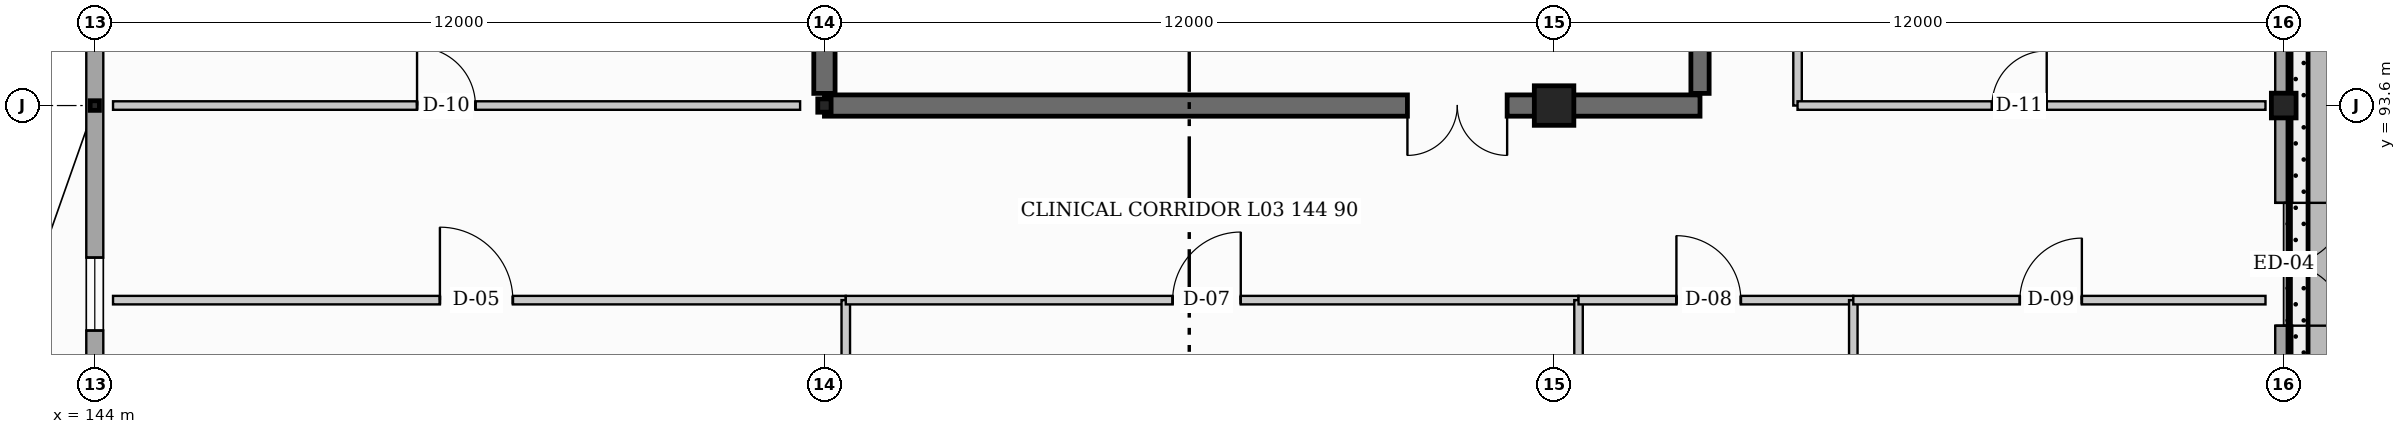
"""IFC4 building model, lengths in metres.
Left out: names, types, materials, properties, quantities, classifications, styles, units other than length and angle.
Written with IfcOpenShell. Run it as: python <this file> out.ifc"""

import sys

from ifc_helpers import new_model, si_unit, direction, frame, frame_2d, origin, origin_2d, place, context, subcontext, project, spatial, rectangle, hollow_circle, i_section, extrude, element, fill, save


model = new_model("IFC4")
c1 = context("Model", 3, precision=1e-05, world=origin(), true_north=direction((0.0, 1.0)))
c2 = subcontext(c1, "Body", "Model", "MODEL_VIEW")
j1 = project(units=[si_unit("LENGTHUNIT", "METRE"), si_unit("PLANEANGLEUNIT", "RADIAN")], contexts=[c1])
p1 = place(None, origin())
s1 = spatial("IfcSite", under=j1, at=p1, CompositionType="ELEMENT")
p2 = place(p1, origin())
s2 = spatial("IfcBuilding", under=s1, at=p2, CompositionType="ELEMENT")
p3 = place(p2, frame((0.0, 0.0, 14.4)))
s3 = spatial("IfcBuildingStorey", under=s2, at=p3, CompositionType="ELEMENT", Elevation=14.4)
p4 = place(p3, frame((144.0, 93.6, 0.0), z_axis=(0.0, 0.0, 1.0), x_axis=(1.0, 0.0, 0.0)))
e1 = element("IfcColumn", 1, at=p4, inside=s3, PredefinedType="COLUMN", context=c2, shape_type="SweptSolid", body=[
    extrude(i_section(OverallWidth=0.153, OverallDepth=0.158, WebThickness=0.007, FlangeThickness=0.01, at=origin_2d()), origin(), (0.0, 0.0, 1.0), 3.9),
])
p5 = place(p3, frame((156.0, 93.6, 0.0), z_axis=(0.0, 0.0, 1.0), x_axis=(0.0, 1.0, 0.0)))
e2 = element("IfcColumn", 2, at=p5, inside=s3, PredefinedType="COLUMN", context=c2, shape_type="SweptSolid", body=[
    extrude(hollow_circle(Radius=0.11, WallThickness=0.01, at=origin_2d()), origin(), (0.0, 0.0, 1.0), 3.9),
])
p6 = place(p3, frame((168.0, 93.6, 0.0), z_axis=(0.0, 0.0, 1.0), x_axis=(1.0, 0.0, 0.0)))
e3 = element("IfcColumn", 3, at=p6, inside=s3, PredefinedType="COLUMN", context=c2, shape_type="SweptSolid", body=[
    extrude(rectangle(XDim=0.65, YDim=0.65, at=origin_2d()), origin(), (0.0, 0.0, 1.0), 3.9),
])
p7 = place(p3, frame((180.0, 93.6, 0.0), z_axis=(0.0, 0.0, 1.0), x_axis=(0.0, 1.0, 0.0)))
e4 = element("IfcColumn", 4, at=p7, inside=s3, PredefinedType="COLUMN", context=c2, shape_type="SweptSolid", body=[
    extrude(hollow_circle(Radius=0.203, WallThickness=0.016, at=origin_2d()), origin(), (0.0, 0.0, 1.0), 3.9),
])
p8 = place(p3, frame((170.4, 93.6, 0.0), z_axis=(0.0, 0.0, 1.0), x_axis=(-1.0, 0.0, 0.0)))
e5 = element("IfcWall", 5, at=p8, inside=s3, PredefinedType="SHEAR", context=c2, shape_type="SweptSolid", body=[
    extrude(rectangle(XDim=14.4, YDim=0.35, at=frame_2d((7.2, 0.0))), origin(), (0.0, 0.0, 1.0), 3.9),
])
p9 = place(p8, frame((3.172, 0.0, 0.0)))
e6 = element("IfcOpeningElement", 6, at=p9, cuts=e5, PredefinedType="OPENING", context=c2, shape_type="SweptSolid", body=[
    extrude(rectangle(XDim=1.64, YDim=2.2, at=frame_2d((0.82, 1.1))), frame((0.0, 0.185, 0.0), z_axis=(0.0, -1.0, 0.0), x_axis=(1.0, 0.0, 0.0)), (0.0, 0.0, 1.0), 0.37),
])
p10 = place(p3, frame((156.0, 93.8, 0.0), z_axis=(0.0, 0.0, 1.0), x_axis=(0.0, 1.0, 0.0)))
e7 = element("IfcWall", 7, at=p10, inside=s3, PredefinedType="SHEAR", context=c2, shape_type="SweptSolid", body=[
    extrude(rectangle(XDim=8.0, YDim=0.35, at=frame_2d((4.0, 0.0))), origin(), (0.0, 0.0, 1.0), 3.9),
])
p11 = place(p3, frame((170.4, 101.8, 0.0), z_axis=(0.0, 0.0, 1.0), x_axis=(0.0, -1.0, 0.0)))
e8 = element("IfcWall", 8, at=p11, inside=s3, PredefinedType="SHEAR", context=c2, shape_type="SweptSolid", body=[
    extrude(rectangle(XDim=8.0, YDim=0.3, at=frame_2d((4.0, 0.0))), origin(), (0.0, 0.0, 1.0), 3.9),
])
p12 = place(p3, frame((180.0, 126.0, 0.0), z_axis=(0.0, 0.0, 1.0), x_axis=(0.0, -1.0, 0.0)))
e9 = element("IfcWall", 9, at=p12, inside=s3, PredefinedType="STANDARD", context=c2, shape_type="SweptSolid", body=[
    extrude(rectangle(XDim=44.4, YDim=0.28, at=frame_2d((22.2, 0.0))), origin(), (0.0, 0.0, 1.0), 2.935),
])
p13 = place(p12, frame((34.0, 0.0, 0.0)))
e10 = element("IfcOpeningElement", 10, at=p13, cuts=e9, PredefinedType="OPENING", context=c2, shape_type="SweptSolid", body=[
    extrude(rectangle(XDim=2.02, YDim=2.2, at=frame_2d((1.01, 1.1))), frame((0.0, 0.15, 0.0), z_axis=(0.0, -1.0, 0.0), x_axis=(1.0, 0.0, 0.0)), (0.0, 0.0, 1.0), 0.3),
])
p14 = place(p12, frame((1.1, 0.0, 0.695)))
e11 = element("IfcOpeningElement", 11, at=p14, cuts=e9, PredefinedType="OPENING", context=c2, shape_type="SweptSolid", body=[
    extrude(rectangle(XDim=0.9, YDim=2.1, at=frame_2d((0.45, 1.05))), frame((0.0, 0.15, 0.0), z_axis=(0.0, -1.0, 0.0), x_axis=(1.0, 0.0, 0.0)), (0.0, 0.0, 1.0), 0.3),
])
p15 = place(p12, frame((4.7, 0.0, 0.695)))
e12 = element("IfcOpeningElement", 12, at=p15, cuts=e9, PredefinedType="OPENING", context=c2, shape_type="SweptSolid", body=[
    extrude(rectangle(XDim=0.9, YDim=2.1, at=frame_2d((0.45, 1.05))), frame((0.0, 0.15, 0.0), z_axis=(0.0, -1.0, 0.0), x_axis=(1.0, 0.0, 0.0)), (0.0, 0.0, 1.0), 0.3),
])
p16 = place(p12, frame((8.3, 0.0, 0.695)))
e13 = element("IfcOpeningElement", 13, at=p16, cuts=e9, PredefinedType="OPENING", context=c2, shape_type="SweptSolid", body=[
    extrude(rectangle(XDim=0.9, YDim=2.1, at=frame_2d((0.45, 1.05))), frame((0.0, 0.15, 0.0), z_axis=(0.0, -1.0, 0.0), x_axis=(1.0, 0.0, 0.0)), (0.0, 0.0, 1.0), 0.3),
])
p17 = place(p12, frame((11.9, 0.0, 0.695)))
e14 = element("IfcOpeningElement", 14, at=p17, cuts=e9, PredefinedType="OPENING", context=c2, shape_type="SweptSolid", body=[
    extrude(rectangle(XDim=0.9, YDim=2.1, at=frame_2d((0.45, 1.05))), frame((0.0, 0.15, 0.0), z_axis=(0.0, -1.0, 0.0), x_axis=(1.0, 0.0, 0.0)), (0.0, 0.0, 1.0), 0.3),
])
p18 = place(p12, frame((15.5, 0.0, 0.695)))
e15 = element("IfcOpeningElement", 15, at=p18, cuts=e9, PredefinedType="OPENING", context=c2, shape_type="SweptSolid", body=[
    extrude(rectangle(XDim=0.9, YDim=2.1, at=frame_2d((0.45, 1.05))), frame((0.0, 0.15, 0.0), z_axis=(0.0, -1.0, 0.0), x_axis=(1.0, 0.0, 0.0)), (0.0, 0.0, 1.0), 0.3),
])
p19 = place(p12, frame((19.1, 0.0, 0.695)))
e16 = element("IfcOpeningElement", 16, at=p19, cuts=e9, PredefinedType="OPENING", context=c2, shape_type="SweptSolid", body=[
    extrude(rectangle(XDim=0.9, YDim=2.1, at=frame_2d((0.45, 1.05))), frame((0.0, 0.15, 0.0), z_axis=(0.0, -1.0, 0.0), x_axis=(1.0, 0.0, 0.0)), (0.0, 0.0, 1.0), 0.3),
])
p20 = place(p12, frame((22.7, 0.0, 0.695)))
e17 = element("IfcOpeningElement", 17, at=p20, cuts=e9, PredefinedType="OPENING", context=c2, shape_type="SweptSolid", body=[
    extrude(rectangle(XDim=0.9, YDim=2.1, at=frame_2d((0.45, 1.05))), frame((0.0, 0.15, 0.0), z_axis=(0.0, -1.0, 0.0), x_axis=(1.0, 0.0, 0.0)), (0.0, 0.0, 1.0), 0.3),
])
p21 = place(p12, frame((26.3, 0.0, 0.695)))
e18 = element("IfcOpeningElement", 18, at=p21, cuts=e9, PredefinedType="OPENING", context=c2, shape_type="SweptSolid", body=[
    extrude(rectangle(XDim=0.9, YDim=2.1, at=frame_2d((0.45, 1.05))), frame((0.0, 0.15, 0.0), z_axis=(0.0, -1.0, 0.0), x_axis=(1.0, 0.0, 0.0)), (0.0, 0.0, 1.0), 0.3),
])
p22 = place(p12, frame((29.9, 0.0, 0.695)))
e19 = element("IfcOpeningElement", 19, at=p22, cuts=e9, PredefinedType="OPENING", context=c2, shape_type="SweptSolid", body=[
    extrude(rectangle(XDim=0.9, YDim=2.1, at=frame_2d((0.45, 1.05))), frame((0.0, 0.15, 0.0), z_axis=(0.0, -1.0, 0.0), x_axis=(1.0, 0.0, 0.0)), (0.0, 0.0, 1.0), 0.3),
])
p23 = place(p12, frame((37.1, 0.0, 0.695)))
e20 = element("IfcOpeningElement", 20, at=p23, cuts=e9, PredefinedType="OPENING", context=c2, shape_type="SweptSolid", body=[
    extrude(rectangle(XDim=0.9, YDim=2.1, at=frame_2d((0.45, 1.05))), frame((0.0, 0.15, 0.0), z_axis=(0.0, -1.0, 0.0), x_axis=(1.0, 0.0, 0.0)), (0.0, 0.0, 1.0), 0.3),
])
p24 = place(p12, frame((40.7, 0.0, 0.695)))
e21 = element("IfcOpeningElement", 21, at=p24, cuts=e9, PredefinedType="OPENING", context=c2, shape_type="SweptSolid", body=[
    extrude(rectangle(XDim=0.9, YDim=2.1, at=frame_2d((0.45, 1.05))), frame((0.0, 0.15, 0.0), z_axis=(0.0, -1.0, 0.0), x_axis=(1.0, 0.0, 0.0)), (0.0, 0.0, 1.0), 0.3),
])
p25 = place(p3, frame((144.0, 81.6, 0.0), z_axis=(0.0, 0.0, 1.0), x_axis=(0.0, 1.0, 0.0)))
e22 = element("IfcWall", 22, at=p25, inside=s3, PredefinedType="STANDARD", context=c2, shape_type="SweptSolid", body=[
    extrude(rectangle(XDim=44.4, YDim=0.28, at=frame_2d((22.2, 0.0))), origin(), (0.0, 0.0, 1.0), 2.935),
])
p26 = place(p25, frame((1.1, 0.0, 0.95)))
e23 = element("IfcOpeningElement", 23, at=p26, cuts=e22, PredefinedType="OPENING", context=c2, shape_type="SweptSolid", body=[
    extrude(rectangle(XDim=1.2, YDim=1.5, at=frame_2d((0.6, 0.75))), frame((0.0, 0.15, 0.0), z_axis=(0.0, -1.0, 0.0), x_axis=(1.0, 0.0, 0.0)), (0.0, 0.0, 1.0), 0.3),
])
p27 = place(p25, frame((4.7, 0.0, 0.95)))
e24 = element("IfcOpeningElement", 24, at=p27, cuts=e22, PredefinedType="OPENING", context=c2, shape_type="SweptSolid", body=[
    extrude(rectangle(XDim=1.2, YDim=1.5, at=frame_2d((0.6, 0.75))), frame((0.0, 0.15, 0.0), z_axis=(0.0, -1.0, 0.0), x_axis=(1.0, 0.0, 0.0)), (0.0, 0.0, 1.0), 0.3),
])
p28 = place(p25, frame((8.3, 0.0, 0.95)))
e25 = element("IfcOpeningElement", 25, at=p28, cuts=e22, PredefinedType="OPENING", context=c2, shape_type="SweptSolid", body=[
    extrude(rectangle(XDim=1.2, YDim=1.5, at=frame_2d((0.6, 0.75))), frame((0.0, 0.15, 0.0), z_axis=(0.0, -1.0, 0.0), x_axis=(1.0, 0.0, 0.0)), (0.0, 0.0, 1.0), 0.3),
])
p29 = place(p25, frame((15.5, 0.0, 0.95)))
e26 = element("IfcOpeningElement", 26, at=p29, cuts=e22, PredefinedType="OPENING", context=c2, shape_type="SweptSolid", body=[
    extrude(rectangle(XDim=1.2, YDim=1.5, at=frame_2d((0.6, 0.75))), frame((0.0, 0.15, 0.0), z_axis=(0.0, -1.0, 0.0), x_axis=(1.0, 0.0, 0.0)), (0.0, 0.0, 1.0), 0.3),
])
p30 = place(p25, frame((19.1, 0.0, 0.95)))
e27 = element("IfcOpeningElement", 27, at=p30, cuts=e22, PredefinedType="OPENING", context=c2, shape_type="SweptSolid", body=[
    extrude(rectangle(XDim=1.2, YDim=1.5, at=frame_2d((0.6, 0.75))), frame((0.0, 0.15, 0.0), z_axis=(0.0, -1.0, 0.0), x_axis=(1.0, 0.0, 0.0)), (0.0, 0.0, 1.0), 0.3),
])
p31 = place(p25, frame((26.3, 0.0, 0.95)))
e28 = element("IfcOpeningElement", 28, at=p31, cuts=e22, PredefinedType="OPENING", context=c2, shape_type="SweptSolid", body=[
    extrude(rectangle(XDim=1.2, YDim=1.5, at=frame_2d((0.6, 0.75))), frame((0.0, 0.15, 0.0), z_axis=(0.0, -1.0, 0.0), x_axis=(1.0, 0.0, 0.0)), (0.0, 0.0, 1.0), 0.3),
])
p32 = place(p25, frame((29.9, 0.0, 0.95)))
e29 = element("IfcOpeningElement", 29, at=p32, cuts=e22, PredefinedType="OPENING", context=c2, shape_type="SweptSolid", body=[
    extrude(rectangle(XDim=1.2, YDim=1.5, at=frame_2d((0.6, 0.75))), frame((0.0, 0.15, 0.0), z_axis=(0.0, -1.0, 0.0), x_axis=(1.0, 0.0, 0.0)), (0.0, 0.0, 1.0), 0.3),
])
p33 = place(p25, frame((37.1, 0.0, 0.95)))
e30 = element("IfcOpeningElement", 30, at=p33, cuts=e22, PredefinedType="OPENING", context=c2, shape_type="SweptSolid", body=[
    extrude(rectangle(XDim=1.2, YDim=1.5, at=frame_2d((0.6, 0.75))), frame((0.0, 0.15, 0.0), z_axis=(0.0, -1.0, 0.0), x_axis=(1.0, 0.0, 0.0)), (0.0, 0.0, 1.0), 0.3),
])
p34 = place(p25, frame((40.7, 0.0, 0.95)))
e31 = element("IfcOpeningElement", 31, at=p34, cuts=e22, PredefinedType="OPENING", context=c2, shape_type="SweptSolid", body=[
    extrude(rectangle(XDim=1.2, YDim=1.5, at=frame_2d((0.6, 0.75))), frame((0.0, 0.15, 0.0), z_axis=(0.0, -1.0, 0.0), x_axis=(1.0, 0.0, 0.0)), (0.0, 0.0, 1.0), 0.3),
])
p35 = place(p3, frame((144.3, 90.4, 0.0), z_axis=(0.0, 0.0, 1.0), x_axis=(1.0, 0.0, 0.0)))
e32 = element("IfcWall", 32, at=p35, inside=s3, PredefinedType="PARTITIONING", context=c2, shape_type="SweptSolid", body=[
    extrude(rectangle(XDim=12.051, YDim=0.14, at=frame_2d((6.025, 0.0))), origin(), (0.0, 0.0, 1.0), 3.428),
])
p36 = place(p35, frame((5.376, 0.0, 0.0)))
e33 = element("IfcOpeningElement", 33, at=p36, cuts=e32, PredefinedType="OPENING", context=c2, shape_type="SweptSolid", body=[
    extrude(rectangle(XDim=1.2, YDim=2.12, at=frame_2d((0.6, 1.06))), frame((0.0, 0.08, 0.0), z_axis=(0.0, -1.0, 0.0), x_axis=(1.0, 0.0, 0.0)), (0.0, 0.0, 1.0), 0.16),
])
p37 = place(p3, frame((156.351, 81.9, 0.0), z_axis=(0.0, 0.0, 1.0), x_axis=(0.0, 1.0, 0.0)))
e34 = element("IfcWall", 34, at=p37, inside=s3, PredefinedType="PARTITIONING", context=c2, shape_type="SweptSolid", body=[
    extrude(rectangle(XDim=8.5, YDim=0.14, at=frame_2d((4.25, 0.0))), origin(), (0.0, 0.0, 1.0), 3.357),
])
p38 = place(p3, frame((156.351, 90.4, 0.0), z_axis=(0.0, 0.0, 1.0), x_axis=(1.0, 0.0, 0.0)))
e35 = element("IfcWall", 35, at=p38, inside=s3, PredefinedType="PARTITIONING", context=c2, shape_type="SweptSolid", body=[
    extrude(rectangle(XDim=12.051, YDim=0.14, at=frame_2d((6.025, 0.0))), origin(), (0.0, 0.0, 1.0), 2.935),
])
p39 = place(p38, frame((5.376, 0.0, 0.0)))
e36 = element("IfcOpeningElement", 36, at=p39, cuts=e35, PredefinedType="OPENING", context=c2, shape_type="SweptSolid", body=[
    extrude(rectangle(XDim=1.12, YDim=2.08, at=frame_2d((0.56, 1.04))), frame((0.0, 0.08, 0.0), z_axis=(0.0, -1.0, 0.0), x_axis=(1.0, 0.0, 0.0)), (0.0, 0.0, 1.0), 0.16),
])
p40 = place(p3, frame((168.402, 81.9, 0.0), z_axis=(0.0, 0.0, 1.0), x_axis=(0.0, 1.0, 0.0)))
e37 = element("IfcWall", 37, at=p40, inside=s3, PredefinedType="PARTITIONING", context=c2, shape_type="SweptSolid", body=[
    extrude(rectangle(XDim=8.5, YDim=0.14, at=frame_2d((4.25, 0.0))), origin(), (0.0, 0.0, 1.0), 3.425),
])
p41 = place(p3, frame((168.402, 90.4, 0.0), z_axis=(0.0, 0.0, 1.0), x_axis=(1.0, 0.0, 0.0)))
e38 = element("IfcWall", 38, at=p41, inside=s3, PredefinedType="PARTITIONING", context=c2, shape_type="SweptSolid", body=[
    extrude(rectangle(XDim=4.519, YDim=0.14, at=frame_2d((2.259, 0.0))), origin(), (0.0, 0.0, 1.0), 3.56),
])
p42 = place(p41, frame((1.61, 0.0, 0.0)))
e39 = element("IfcOpeningElement", 39, at=p42, cuts=e38, PredefinedType="OPENING", context=c2, shape_type="SweptSolid", body=[
    extrude(rectangle(XDim=1.06, YDim=2.1, at=frame_2d((0.53, 1.05))), frame((0.0, 0.08, 0.0), z_axis=(0.0, -1.0, 0.0), x_axis=(1.0, 0.0, 0.0)), (0.0, 0.0, 1.0), 0.16),
])
p43 = place(p3, frame((172.921, 81.9, 0.0), z_axis=(0.0, 0.0, 1.0), x_axis=(0.0, 1.0, 0.0)))
e40 = element("IfcWall", 40, at=p43, inside=s3, PredefinedType="PARTITIONING", context=c2, shape_type="SweptSolid", body=[
    extrude(rectangle(XDim=8.5, YDim=0.14, at=frame_2d((4.25, 0.0))), origin(), (0.0, 0.0, 1.0), 3.425),
])
p44 = place(p3, frame((172.921, 90.4, 0.0), z_axis=(0.0, 0.0, 1.0), x_axis=(1.0, 0.0, 0.0)))
e41 = element("IfcWall", 41, at=p44, inside=s3, PredefinedType="PARTITIONING", context=c2, shape_type="SweptSolid", body=[
    extrude(rectangle(XDim=6.779, YDim=0.14, at=frame_2d((3.39, 0.0))), origin(), (0.0, 0.0, 1.0), 2.985),
])
p45 = place(p44, frame((2.739, 0.0, 0.0)))
e42 = element("IfcOpeningElement", 42, at=p45, cuts=e41, PredefinedType="OPENING", context=c2, shape_type="SweptSolid", body=[
    extrude(rectangle(XDim=1.02, YDim=2.08, at=frame_2d((0.51, 1.04))), frame((0.0, 0.08, 0.0), z_axis=(0.0, -1.0, 0.0), x_axis=(1.0, 0.0, 0.0)), (0.0, 0.0, 1.0), 0.16),
])
p46 = place(p3, frame((144.3, 93.6, 0.0), z_axis=(0.0, 0.0, 1.0), x_axis=(1.0, 0.0, 0.0)))
e43 = element("IfcWall", 43, at=p46, inside=s3, PredefinedType="PARTITIONING", context=c2, shape_type="SweptSolid", body=[
    extrude(rectangle(XDim=11.3, YDim=0.14, at=frame_2d((5.65, 0.0))), origin(), (0.0, 0.0, 1.0), 3.142),
])
p47 = place(p46, frame((5.0, 0.0, 0.0)))
e44 = element("IfcOpeningElement", 44, at=p47, cuts=e43, PredefinedType="OPENING", context=c2, shape_type="SweptSolid", body=[
    extrude(rectangle(XDim=0.96, YDim=2.06, at=frame_2d((0.48, 1.03))), frame((0.0, 0.08, 0.0), z_axis=(0.0, -1.0, 0.0), x_axis=(1.0, 0.0, 0.0)), (0.0, 0.0, 1.0), 0.16),
])
p48 = place(p3, frame((172.004, 93.6, 0.0), z_axis=(0.0, 0.0, 1.0), x_axis=(0.0, 1.0, 0.0)))
e45 = element("IfcWall", 45, at=p48, inside=s3, PredefinedType="PARTITIONING", context=c2, shape_type="SweptSolid", body=[
    extrude(rectangle(XDim=32.1, YDim=0.14, at=frame_2d((16.05, 0.0))), origin(), (0.0, 0.0, 1.0), 2.935),
])
p49 = place(p3, frame((172.004, 93.6, 0.0), z_axis=(0.0, 0.0, 1.0), x_axis=(1.0, 0.0, 0.0)))
e46 = element("IfcWall", 46, at=p49, inside=s3, PredefinedType="PARTITIONING", context=c2, shape_type="SweptSolid", body=[
    extrude(rectangle(XDim=7.696, YDim=0.14, at=frame_2d((3.848, 0.0))), origin(), (0.0, 0.0, 1.0), 2.985),
])
p50 = place(p49, frame((3.198, 0.0, 0.0)))
e47 = element("IfcOpeningElement", 47, at=p50, cuts=e46, PredefinedType="OPENING", context=c2, shape_type="SweptSolid", body=[
    extrude(rectangle(XDim=0.9, YDim=2.1, at=frame_2d((0.45, 1.05))), frame((0.0, 0.08, 0.0), z_axis=(0.0, -1.0, 0.0), x_axis=(1.0, 0.0, 0.0)), (0.0, 0.0, 1.0), 0.16),
])
p51 = place(p13, origin())
e48 = element("IfcDoor", 48, at=p51, inside=s3, OperationType="DOUBLE_DOOR_SINGLE_SWING", PredefinedType="DOOR", context=c2, shape_type="SweptSolid", body=[
    extrude(rectangle(XDim=2.02, YDim=2.2, at=frame_2d((1.01, 1.1))), frame((0.0, 0.025, 0.0), z_axis=(0.0, -1.0, 0.0), x_axis=(1.0, 0.0, 0.0)), (0.0, 0.0, 1.0), 0.05),
])
fill(e10, e48)
p52 = place(p28, origin())
e49 = element("IfcWindow", 49, at=p52, inside=s3, PartitioningType="SINGLE_PANEL", PredefinedType="WINDOW", context=c2, shape_type="SweptSolid", body=[
    extrude(rectangle(XDim=1.2, YDim=1.5, at=frame_2d((0.6, 0.75))), frame((0.0, 0.03, 0.0), z_axis=(0.0, -1.0, 0.0), x_axis=(1.0, 0.0, 0.0)), (0.0, 0.0, 1.0), 0.06),
])
fill(e25, e49)
p53 = place(p9, origin())
e50 = element("IfcDoor", 50, at=p53, inside=s3, OperationType="DOUBLE_DOOR_SINGLE_SWING", PredefinedType="DOOR", context=c2, shape_type="SweptSolid", body=[
    extrude(rectangle(XDim=1.64, YDim=2.2, at=frame_2d((0.82, 1.1))), frame((0.0, 0.025, 0.0), z_axis=(0.0, -1.0, 0.0), x_axis=(1.0, 0.0, 0.0)), (0.0, 0.0, 1.0), 0.05),
])
fill(e6, e50)
p54 = place(p36, origin())
e51 = element("IfcDoor", 51, at=p54, inside=s3, OperationType="SINGLE_SWING_LEFT", PredefinedType="DOOR", context=c2, shape_type="SweptSolid", body=[
    extrude(rectangle(XDim=1.2, YDim=2.12, at=frame_2d((0.6, 1.06))), frame((0.0, 0.025, 0.0), z_axis=(0.0, -1.0, 0.0), x_axis=(1.0, 0.0, 0.0)), (0.0, 0.0, 1.0), 0.05),
])
fill(e33, e51)
p55 = place(p39, origin())
e52 = element("IfcDoor", 52, at=p55, inside=s3, OperationType="SINGLE_SWING_RIGHT", PredefinedType="DOOR", context=c2, shape_type="SweptSolid", body=[
    extrude(rectangle(XDim=1.12, YDim=2.08, at=frame_2d((0.56, 1.04))), frame((0.0, 0.025, 0.0), z_axis=(0.0, -1.0, 0.0), x_axis=(1.0, 0.0, 0.0)), (0.0, 0.0, 1.0), 0.05),
])
fill(e36, e52)
p56 = place(p42, origin())
e53 = element("IfcDoor", 53, at=p56, inside=s3, OperationType="SINGLE_SWING_LEFT", PredefinedType="DOOR", context=c2, shape_type="SweptSolid", body=[
    extrude(rectangle(XDim=1.06, YDim=2.1, at=frame_2d((0.53, 1.05))), frame((0.0, 0.025, 0.0), z_axis=(0.0, -1.0, 0.0), x_axis=(1.0, 0.0, 0.0)), (0.0, 0.0, 1.0), 0.05),
])
fill(e39, e53)
p57 = place(p45, origin())
e54 = element("IfcDoor", 54, at=p57, inside=s3, OperationType="SINGLE_SWING_RIGHT", PredefinedType="DOOR", context=c2, shape_type="SweptSolid", body=[
    extrude(rectangle(XDim=1.02, YDim=2.08, at=frame_2d((0.51, 1.04))), frame((0.0, 0.025, 0.0), z_axis=(0.0, -1.0, 0.0), x_axis=(1.0, 0.0, 0.0)), (0.0, 0.0, 1.0), 0.05),
])
fill(e42, e54)
p58 = place(p47, origin())
e55 = element("IfcDoor", 55, at=p58, inside=s3, OperationType="SINGLE_SWING_LEFT", PredefinedType="DOOR", context=c2, shape_type="SweptSolid", body=[
    extrude(rectangle(XDim=0.96, YDim=2.06, at=frame_2d((0.48, 1.03))), frame((0.0, 0.025, 0.0), z_axis=(0.0, -1.0, 0.0), x_axis=(1.0, 0.0, 0.0)), (0.0, 0.0, 1.0), 0.05),
])
fill(e44, e55)
p59 = place(p50, origin())
e56 = element("IfcDoor", 56, at=p59, inside=s3, OperationType="SINGLE_SWING_RIGHT", PredefinedType="DOOR", context=c2, shape_type="SweptSolid", body=[
    extrude(rectangle(XDim=0.9, YDim=2.1, at=frame_2d((0.45, 1.05))), frame((0.0, 0.025, 0.0), z_axis=(0.0, -1.0, 0.0), x_axis=(1.0, 0.0, 0.0)), (0.0, 0.0, 1.0), 0.05),
])
fill(e47, e56)
save(model, sys.argv[1])
